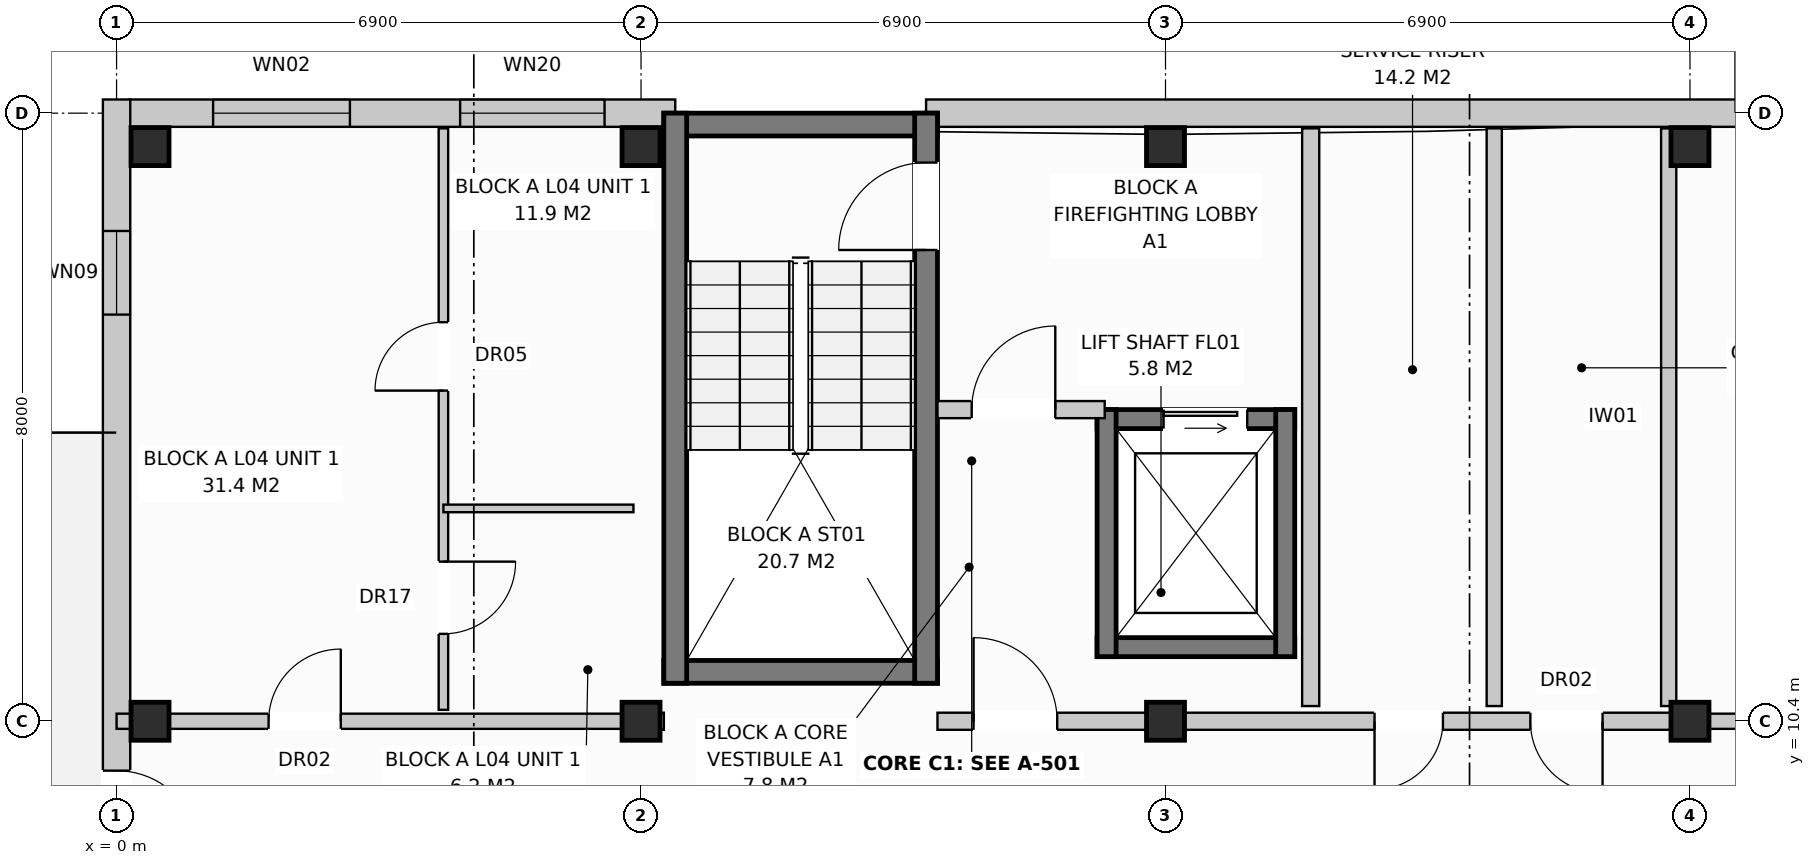
"""IFC4 building model, lengths in metres.
Left out: names, types, materials, properties, quantities, classifications, styles, units other than length and angle.
Written with IfcOpenShell. Run it as: python <this file> out.ifc"""

import sys

from ifc_helpers import new_model, si_unit, direction, frame, frame_2d, origin, origin_with_axes, origin_2d, place, context, subcontext, project, spatial, rectangle, extrude, element, fill, save


model = new_model("IFC4")
c1 = context("Model", 3, precision=1e-05, world=origin(), true_north=direction((0.0, 1.0)))
c2 = subcontext(c1, "Body", "Model", "MODEL_VIEW")
j1 = project(units=[si_unit("LENGTHUNIT", "METRE"), si_unit("PLANEANGLEUNIT", "RADIAN")], contexts=[c1])
p1 = place(None, origin())
s1 = spatial("IfcSite", under=j1, at=p1, CompositionType="ELEMENT")
p2 = place(p1, origin())
s2 = spatial("IfcBuilding", under=s1, at=p2, CompositionType="ELEMENT")
p3 = place(p2, frame((0.0, 0.0, 14.4)))
s3 = spatial("IfcBuildingStorey", under=s2, at=p3, CompositionType="ELEMENT", Elevation=14.4)
for number, where, z_axis, x_axis in (
    (1, (0.44, 10.4, 0.0), (0.0, 0.0, 1.0), (1.0, 0.0, 0.0)),
    (2, (0.44, 17.96, 0.0), (0.0, 0.0, 1.0), (1.0, 0.0, 0.0)),
    (3, (6.9, 10.4, 0.0), (0.0, 0.0, 1.0), (1.0, 0.0, 0.0)),
    (4, (6.9, 17.96, 0.0), (0.0, 0.0, 1.0), (1.0, 0.0, 0.0)),
    (5, (13.8, 10.4, 0.0), (0.0, 0.0, 1.0), (1.0, 0.0, 0.0)),
    (6, (13.8, 17.96, 0.0), (0.0, 0.0, 1.0), (1.0, 0.0, 0.0)),
    (7, (20.7, 10.4, 0.0), (0.0, 0.0, 1.0), (1.0, 0.0, 0.0)),
    (8, (20.7, 17.96, 0.0), (0.0, 0.0, 1.0), (1.0, 0.0, 0.0)),
):
    element("IfcColumn", number, at=place(p3, frame(where, z_axis=z_axis, x_axis=x_axis)), inside=s3, PredefinedType="COLUMN", context=c2, shape_type="SweptSolid", body=[
        extrude(rectangle(XDim=0.5, YDim=0.5, at=origin_2d()), origin(), (0.0, 0.0, 1.0), 3.2),
    ])
p4 = place(p3, frame((0.17, 18.4, 0.0), z_axis=(0.0, 0.0, 1.0), x_axis=(1.0, 0.0, 0.0)))
e9 = element("IfcWall", 9, at=p4, inside=s3, PredefinedType="STANDARD", context=c2, shape_type="SweptSolid", body=[
    extrude(rectangle(XDim=7.18, YDim=0.36, at=frame_2d((3.59, 0.0))), origin(), (0.0, 0.0, 1.0), 2.94),
])
p5 = place(p4, frame((1.1, 0.0, 0.8)))
e10 = element("IfcOpeningElement", 10, at=p5, cuts=e9, PredefinedType="OPENING", context=c2, shape_type="SweptSolid", body=[
    extrude(rectangle(XDim=1.8, YDim=1.7, at=frame_2d((0.9, 0.85))), frame((0.0, 0.192, 0.0), z_axis=(0.0, -1.0, 0.0), x_axis=(1.0, 0.0, 0.0)), (0.0, 0.0, 1.0), 0.384),
])
p6 = place(p4, frame((4.35, 0.0, 0.8)))
e11 = element("IfcOpeningElement", 11, at=p6, cuts=e9, PredefinedType="OPENING", context=c2, shape_type="SweptSolid", body=[
    extrude(rectangle(XDim=1.9, YDim=1.85, at=frame_2d((0.95, 0.925))), frame((0.0, 0.192, 0.0), z_axis=(0.0, -1.0, 0.0), x_axis=(1.0, 0.0, 0.0)), (0.0, 0.0, 1.0), 0.384),
])
p7 = place(p3, frame((10.65, 18.4, 0.0), z_axis=(0.0, 0.0, 1.0), x_axis=(1.0, 0.0, 0.0)))
e12 = element("IfcWall", 12, at=p7, inside=s3, PredefinedType="STANDARD", context=c2, shape_type="SweptSolid", body=[
    extrude(rectangle(XDim=17.4, YDim=0.36, at=frame_2d((8.7, 0.0))), origin(), (0.0, 0.0, 1.0), 2.94),
])
p8 = place(p7, frame((11.82, 0.0, 0.0)))
e13 = element("IfcOpeningElement", 13, at=p8, cuts=e12, PredefinedType="OPENING", context=c2, shape_type="SweptSolid", body=[
    extrude(rectangle(XDim=1.05, YDim=2.12, at=frame_2d((0.525, 1.06))), frame((0.0, 0.192, 0.0), z_axis=(0.0, -1.0, 0.0), x_axis=(1.0, 0.0, 0.0)), (0.0, 0.0, 1.0), 0.384),
])
p9 = place(p7, frame((14.87, 0.0, 0.72)))
e14 = element("IfcOpeningElement", 14, at=p9, cuts=e12, PredefinedType="OPENING", context=c2, shape_type="SweptSolid", body=[
    extrude(rectangle(XDim=1.1, YDim=1.5, at=frame_2d((0.55, 0.75))), frame((0.0, 0.192, 0.0), z_axis=(0.0, -1.0, 0.0), x_axis=(1.0, 0.0, 0.0)), (0.0, 0.0, 1.0), 0.384),
])
p10 = place(p3, frame((0.0, -0.18, 0.0), z_axis=(0.0, 0.0, 1.0), x_axis=(0.0, 1.0, 0.0)))
e15 = element("IfcWall", 15, at=p10, inside=s3, PredefinedType="STANDARD", context=c2, shape_type="SweptSolid", body=[
    extrude(rectangle(XDim=18.76, YDim=0.36, at=frame_2d((9.38, 0.0))), origin(), (0.0, 0.0, 1.0), 2.94),
])
p11 = place(p10, frame((8.83, 0.0, 0.0)))
e16 = element("IfcOpeningElement", 16, at=p11, cuts=e15, PredefinedType="OPENING", context=c2, shape_type="SweptSolid", body=[
    extrude(rectangle(XDim=1.1, YDim=2.1, at=frame_2d((0.55, 1.05))), frame((0.0, 0.192, 0.0), z_axis=(0.0, -1.0, 0.0), x_axis=(1.0, 0.0, 0.0)), (0.0, 0.0, 1.0), 0.384),
])
p12 = place(p10, frame((1.73, 0.0, 0.72)))
e17 = element("IfcOpeningElement", 17, at=p12, cuts=e15, PredefinedType="OPENING", context=c2, shape_type="SweptSolid", body=[
    extrude(rectangle(XDim=1.1, YDim=1.5, at=frame_2d((0.55, 0.75))), frame((0.0, 0.192, 0.0), z_axis=(0.0, -1.0, 0.0), x_axis=(1.0, 0.0, 0.0)), (0.0, 0.0, 1.0), 0.384),
])
p13 = place(p10, frame((15.93, 0.0, 0.72)))
e18 = element("IfcOpeningElement", 18, at=p13, cuts=e15, PredefinedType="OPENING", context=c2, shape_type="SweptSolid", body=[
    extrude(rectangle(XDim=1.1, YDim=1.5, at=frame_2d((0.55, 0.75))), frame((0.0, 0.192, 0.0), z_axis=(0.0, -1.0, 0.0), x_axis=(1.0, 0.0, 0.0)), (0.0, 0.0, 1.0), 0.384),
])
for number, where, z_axis, x_axis in (
    (19, (7.2, 18.25, 0.0), (0.0, 0.0, 1.0), (1.0, 0.0, 0.0)),
    (20, (7.2, 11.05, 0.0), (0.0, 0.0, 1.0), (1.0, 0.0, 0.0)),
):
    element("IfcWall", number, at=place(p3, frame(where, z_axis=z_axis, x_axis=x_axis)), inside=s3, PredefinedType="SHEAR", context=c2, shape_type="SweptSolid", body=[
        extrude(rectangle(XDim=3.6, YDim=0.3, at=frame_2d((1.8, 0.0))), origin(), (0.0, 0.0, 1.0), 2.94),
    ])
p14 = place(p3, frame((7.35, 10.9, 0.0), z_axis=(0.0, 0.0, 1.0), x_axis=(0.0, 1.0, 0.0)))
e21 = element("IfcWall", 21, at=p14, inside=s3, PredefinedType="SHEAR", context=c2, shape_type="SweptSolid", body=[
    extrude(rectangle(XDim=7.5, YDim=0.3, at=frame_2d((3.75, 0.0))), origin(), (0.0, 0.0, 1.0), 2.94),
])
p15 = place(p3, frame((10.65, 10.9, 0.0), z_axis=(0.0, 0.0, 1.0), x_axis=(0.0, 1.0, 0.0)))
e22 = element("IfcWall", 22, at=p15, inside=s3, PredefinedType="SHEAR", context=c2, shape_type="SweptSolid", body=[
    extrude(rectangle(XDim=7.5, YDim=0.3, at=frame_2d((3.75, 0.0))), origin(), (0.0, 0.0, 1.0), 2.94),
])
p16 = place(p15, frame((5.7, 0.0, 0.0)))
e23 = element("IfcOpeningElement", 23, at=p16, cuts=e22, PredefinedType="OPENING", context=c2, shape_type="SweptSolid", body=[
    extrude(rectangle(XDim=1.15, YDim=2.15, at=frame_2d((0.575, 1.075))), frame((0.0, 0.162, 0.0), z_axis=(0.0, -1.0, 0.0), x_axis=(1.0, 0.0, 0.0)), (0.0, 0.0, 1.0), 0.324),
])
p17 = place(p3, frame((12.9, 14.375, 0.0), z_axis=(0.0, 0.0, 1.0), x_axis=(1.0, 0.0, 0.0)))
e24 = element("IfcWall", 24, at=p17, inside=s3, PredefinedType="SHEAR", context=c2, shape_type="SweptSolid", body=[
    extrude(rectangle(XDim=2.6, YDim=0.25, at=frame_2d((1.3, 0.0))), origin(), (0.0, 0.0, 1.0), 2.94),
])
p18 = place(p17, frame((0.875, 0.0, 0.0)))
e25 = element("IfcOpeningElement", 25, at=p18, cuts=e24, PredefinedType="OPENING", context=c2, shape_type="SweptSolid", body=[
    extrude(rectangle(XDim=1.1, YDim=2.1, at=frame_2d((0.55, 1.05))), frame((0.0, 0.137, 0.0), z_axis=(0.0, -1.0, 0.0), x_axis=(1.0, 0.0, 0.0)), (0.0, 0.0, 1.0), 0.274),
])
p19 = place(p3, frame((12.9, 11.375, 0.0), z_axis=(0.0, 0.0, 1.0), x_axis=(1.0, 0.0, 0.0)))
e26 = element("IfcWall", 26, at=p19, inside=s3, PredefinedType="SHEAR", context=c2, shape_type="SweptSolid", body=[
    extrude(rectangle(XDim=2.6, YDim=0.25, at=frame_2d((1.3, 0.0))), origin(), (0.0, 0.0, 1.0), 2.94),
])
for number, where, z_axis, x_axis in (
    (27, (13.025, 11.25, 0.0), (0.0, 0.0, 1.0), (0.0, 1.0, 0.0)),
    (28, (15.375, 11.25, 0.0), (0.0, 0.0, 1.0), (0.0, 1.0, 0.0)),
):
    element("IfcWall", number, at=place(p3, frame(where, z_axis=z_axis, x_axis=x_axis)), inside=s3, PredefinedType="SHEAR", context=c2, shape_type="SweptSolid", body=[
        extrude(rectangle(XDim=3.25, YDim=0.25, at=frame_2d((1.625, 0.0))), origin(), (0.0, 0.0, 1.0), 2.94),
    ])
p20 = place(p3, frame((15.71, 10.6, 0.0), z_axis=(0.0, 0.0, 1.0), x_axis=(0.0, 1.0, 0.0)))
e29 = element("IfcWall", 29, at=p20, inside=s3, PredefinedType="PARTITIONING", context=c2, shape_type="SweptSolid", body=[
    extrude(rectangle(XDim=7.6, YDim=0.225, at=frame_2d((3.8, 0.0))), origin(), (0.0, 0.0, 1.0), 2.59),
])
p21 = place(p3, frame((10.8, 14.5, 0.0), z_axis=(0.0, 0.0, 1.0), x_axis=(1.0, 0.0, 0.0)))
e30 = element("IfcWall", 30, at=p21, inside=s3, PredefinedType="PARTITIONING", context=c2, shape_type="SweptSolid", body=[
    extrude(rectangle(XDim=2.2, YDim=0.225, at=frame_2d((1.1, 0.0))), origin(), (0.0, 0.0, 1.0), 2.94),
])
p22 = place(p21, frame((0.45, 0.0, 0.0)))
e31 = element("IfcOpeningElement", 31, at=p22, cuts=e30, PredefinedType="OPENING", context=c2, shape_type="SweptSolid", body=[
    extrude(rectangle(XDim=1.1, YDim=2.15, at=frame_2d((0.55, 1.075))), frame((0.0, 0.125, 0.0), z_axis=(0.0, -1.0, 0.0), x_axis=(1.0, 0.0, 0.0)), (0.0, 0.0, 1.0), 0.249),
])
p23 = place(p3, frame((6.9, 10.4, 0.0), z_axis=(0.0, 0.0, 1.0), x_axis=(1.0, 0.0, 0.0)))
e32 = element("IfcWall", 32, at=p23, inside=s3, PredefinedType="PARTITIONING", context=c2, shape_type="SweptSolid", body=[
    extrude(rectangle(XDim=0.3, YDim=0.225, at=frame_2d((0.15, 0.0))), origin(), (0.0, 0.0, 1.0), 2.94),
])
for number, where, z_axis, x_axis in (
    (33, (18.125, 10.6, 0.0), (0.0, 0.0, 1.0), (0.0, 1.0, 0.0)),
    (34, (20.42, 10.6, 0.0), (0.0, 0.0, 1.0), (0.0, 1.0, 0.0)),
):
    element("IfcWall", number, at=place(p3, frame(where, z_axis=z_axis, x_axis=x_axis)), inside=s3, PredefinedType="PARTITIONING", context=c2, shape_type="SweptSolid", body=[
        extrude(rectangle(XDim=7.6, YDim=0.2, at=frame_2d((3.8, 0.0))), origin(), (0.0, 0.0, 1.0), 2.94),
    ])
p24 = place(p3, frame((10.8, 10.4, 0.0), z_axis=(0.0, 0.0, 1.0), x_axis=(1.0, 0.0, 0.0)))
e35 = element("IfcWall", 35, at=p24, inside=s3, PredefinedType="PARTITIONING", context=c2, shape_type="SweptSolid", body=[
    extrude(rectangle(XDim=9.9, YDim=0.225, at=frame_2d((4.95, 0.0))), origin(), (0.0, 0.0, 1.0), 2.38),
])
p25 = place(p24, frame((0.475, 0.0, 0.0)))
e36 = element("IfcOpeningElement", 36, at=p25, cuts=e35, PredefinedType="OPENING", context=c2, shape_type="SweptSolid", body=[
    extrude(rectangle(XDim=1.1, YDim=2.15, at=frame_2d((0.55, 1.075))), frame((0.0, 0.125, 0.0), z_axis=(0.0, -1.0, 0.0), x_axis=(1.0, 0.0, 0.0)), (0.0, 0.0, 1.0), 0.249),
])
p26 = place(p24, frame((5.75, 0.0, 0.0)))
e37 = element("IfcOpeningElement", 37, at=p26, cuts=e35, PredefinedType="OPENING", context=c2, shape_type="SweptSolid", body=[
    extrude(rectangle(XDim=0.9, YDim=2.1, at=frame_2d((0.45, 1.05))), frame((0.0, 0.125, 0.0), z_axis=(0.0, -1.0, 0.0), x_axis=(1.0, 0.0, 0.0)), (0.0, 0.0, 1.0), 0.249),
])
p27 = place(p24, frame((7.8, 0.0, 0.0)))
e38 = element("IfcOpeningElement", 38, at=p27, cuts=e35, PredefinedType="OPENING", context=c2, shape_type="SweptSolid", body=[
    extrude(rectangle(XDim=0.95, YDim=2.15, at=frame_2d((0.475, 1.075))), frame((0.0, 0.125, 0.0), z_axis=(0.0, -1.0, 0.0), x_axis=(1.0, 0.0, 0.0)), (0.0, 0.0, 1.0), 0.249),
])
p28 = place(p3, frame((0.0, 10.4, 0.0), z_axis=(0.0, 0.0, 1.0), x_axis=(1.0, 0.0, 0.0)))
e39 = element("IfcWall", 39, at=p28, inside=s3, PredefinedType="PARTITIONING", context=c2, shape_type="SweptSolid", body=[
    extrude(rectangle(XDim=6.9, YDim=0.2, at=frame_2d((3.45, 0.0))), origin(), (0.0, 0.0, 1.0), 2.38),
])
p29 = place(p28, frame((2.0, 0.0, 0.0)))
e40 = element("IfcOpeningElement", 40, at=p29, cuts=e39, PredefinedType="OPENING", context=c2, shape_type="SweptSolid", body=[
    extrude(rectangle(XDim=0.95, YDim=2.15, at=frame_2d((0.475, 1.075))), frame((0.0, 0.112, 0.0), z_axis=(0.0, -1.0, 0.0), x_axis=(1.0, 0.0, 0.0)), (0.0, 0.0, 1.0), 0.224),
])
p30 = place(p3, frame((4.3, 10.55, 0.0), z_axis=(0.0, 0.0, 1.0), x_axis=(0.0, 1.0, 0.0)))
e41 = element("IfcWall", 41, at=p30, inside=s3, PredefinedType="PARTITIONING", context=c2, shape_type="SweptSolid", body=[
    extrude(rectangle(XDim=7.65, YDim=0.125, at=frame_2d((3.825, 0.0))), origin(), (0.0, 0.0, 1.0), 2.94),
])
p31 = place(p30, frame((1.0, 0.0, 0.0)))
e42 = element("IfcOpeningElement", 42, at=p31, cuts=e41, PredefinedType="OPENING", context=c2, shape_type="SweptSolid", body=[
    extrude(rectangle(XDim=0.95, YDim=2.1, at=frame_2d((0.475, 1.05))), frame((0.0, 0.074, 0.0), z_axis=(0.0, -1.0, 0.0), x_axis=(1.0, 0.0, 0.0)), (0.0, 0.0, 1.0), 0.149),
])
p32 = place(p30, frame((4.2, 0.0, 0.0)))
e43 = element("IfcOpeningElement", 43, at=p32, cuts=e41, PredefinedType="OPENING", context=c2, shape_type="SweptSolid", body=[
    extrude(rectangle(XDim=0.9, YDim=2.1, at=frame_2d((0.45, 1.05))), frame((0.0, 0.074, 0.0), z_axis=(0.0, -1.0, 0.0), x_axis=(1.0, 0.0, 0.0)), (0.0, 0.0, 1.0), 0.149),
])
p33 = place(p3, frame((4.3, 13.2, 0.0), z_axis=(0.0, 0.0, 1.0), x_axis=(1.0, 0.0, 0.0)))
e44 = element("IfcWall", 44, at=p33, inside=s3, PredefinedType="PARTITIONING", context=c2, shape_type="SweptSolid", body=[
    extrude(rectangle(XDim=2.5, YDim=0.1, at=frame_2d((1.25, 0.0))), origin(), (0.0, 0.0, 1.0), 2.94),
])
p34 = place(p3, frame((20.7, 10.4, 0.0), z_axis=(0.0, 0.0, 1.0), x_axis=(1.0, 0.0, 0.0)))
e45 = element("IfcWall", 45, at=p34, inside=s3, PredefinedType="PARTITIONING", context=c2, shape_type="SweptSolid", body=[
    extrude(rectangle(XDim=6.9, YDim=0.2, at=frame_2d((3.45, 0.0))), origin(), (0.0, 0.0, 1.0), 2.38),
])
p35 = place(p34, frame((2.0, 0.0, 0.0)))
e46 = element("IfcOpeningElement", 46, at=p35, cuts=e45, PredefinedType="OPENING", context=c2, shape_type="SweptSolid", body=[
    extrude(rectangle(XDim=0.95, YDim=2.15, at=frame_2d((0.475, 1.075))), frame((0.0, 0.112, 0.0), z_axis=(0.0, -1.0, 0.0), x_axis=(1.0, 0.0, 0.0)), (0.0, 0.0, 1.0), 0.224),
])
p36 = place(p5, origin_with_axes())
e47 = element("IfcWindow", 47, at=p36, inside=s3, PartitioningType="SINGLE_PANEL", PredefinedType="WINDOW", context=c2, shape_type="SweptSolid", body=[
    extrude(rectangle(XDim=1.8, YDim=1.7, at=frame_2d((0.9, 0.85))), frame((0.0, 0.03, 0.0), z_axis=(0.0, -1.0, 0.0), x_axis=(1.0, 0.0, 0.0)), (0.0, 0.0, 1.0), 0.06),
])
fill(e10, e47)
p37 = place(p6, origin_with_axes())
e48 = element("IfcWindow", 48, at=p37, inside=s3, PartitioningType="SINGLE_PANEL", PredefinedType="WINDOW", context=c2, shape_type="SweptSolid", body=[
    extrude(rectangle(XDim=1.9, YDim=1.85, at=frame_2d((0.95, 0.925))), frame((0.0, 0.03, 0.0), z_axis=(0.0, -1.0, 0.0), x_axis=(1.0, 0.0, 0.0)), (0.0, 0.0, 1.0), 0.06),
])
fill(e11, e48)
p38 = place(p11, frame((1.1, 0.0, 0.0), z_axis=(0.0, 0.0, 1.0), x_axis=(-1.0, 0.0, 0.0)))
e49 = element("IfcDoor", 49, at=p38, inside=s3, OperationType="SINGLE_SWING_LEFT", PredefinedType="DOOR", context=c2, shape_type="SweptSolid", body=[
    extrude(rectangle(XDim=1.1, YDim=2.1, at=frame_2d((0.55, 1.05))), frame((0.0, 0.025, 0.0), z_axis=(0.0, -1.0, 0.0), x_axis=(1.0, 0.0, 0.0)), (0.0, 0.0, 1.0), 0.05),
])
fill(e16, e49)
p39 = place(p13, origin_with_axes())
e50 = element("IfcWindow", 50, at=p39, inside=s3, PartitioningType="SINGLE_PANEL", PredefinedType="WINDOW", context=c2, shape_type="SweptSolid", body=[
    extrude(rectangle(XDim=1.1, YDim=1.5, at=frame_2d((0.55, 0.75))), frame((0.0, 0.03, 0.0), z_axis=(0.0, -1.0, 0.0), x_axis=(1.0, 0.0, 0.0)), (0.0, 0.0, 1.0), 0.06),
])
fill(e18, e50)
p40 = place(p16, origin_with_axes())
e51 = element("IfcDoor", 51, at=p40, inside=s3, OperationType="SINGLE_SWING_LEFT", PredefinedType="DOOR", context=c2, shape_type="SweptSolid", body=[
    extrude(rectangle(XDim=1.15, YDim=2.15, at=frame_2d((0.575, 1.075))), frame((0.0, 0.025, 0.0), z_axis=(0.0, -1.0, 0.0), x_axis=(1.0, 0.0, 0.0)), (0.0, 0.0, 1.0), 0.05),
])
fill(e23, e51)
p41 = place(p18, origin_with_axes())
e52 = element("IfcDoor", 52, at=p41, inside=s3, OperationType="SLIDING_TO_LEFT", PredefinedType="DOOR", context=c2, shape_type="SweptSolid", body=[
    extrude(rectangle(XDim=1.1, YDim=2.1, at=frame_2d((0.55, 1.05))), frame((0.0, 0.025, 0.0), z_axis=(0.0, -1.0, 0.0), x_axis=(1.0, 0.0, 0.0)), (0.0, 0.0, 1.0), 0.05),
])
fill(e25, e52)
p42 = place(p22, origin_with_axes())
e53 = element("IfcDoor", 53, at=p42, inside=s3, OperationType="SINGLE_SWING_RIGHT", PredefinedType="DOOR", context=c2, shape_type="SweptSolid", body=[
    extrude(rectangle(XDim=1.1, YDim=2.15, at=frame_2d((0.55, 1.075))), frame((0.0, 0.025, 0.0), z_axis=(0.0, -1.0, 0.0), x_axis=(1.0, 0.0, 0.0)), (0.0, 0.0, 1.0), 0.05),
])
fill(e31, e53)
p43 = place(p25, origin_with_axes())
e54 = element("IfcDoor", 54, at=p43, inside=s3, OperationType="SINGLE_SWING_LEFT", PredefinedType="DOOR", context=c2, shape_type="SweptSolid", body=[
    extrude(rectangle(XDim=1.1, YDim=2.15, at=frame_2d((0.55, 1.075))), frame((0.0, 0.025, 0.0), z_axis=(0.0, -1.0, 0.0), x_axis=(1.0, 0.0, 0.0)), (0.0, 0.0, 1.0), 0.05),
])
fill(e36, e54)
p44 = place(p26, frame((0.9, 0.0, 0.0), z_axis=(0.0, 0.0, 1.0), x_axis=(-1.0, 0.0, 0.0)))
e55 = element("IfcDoor", 55, at=p44, inside=s3, OperationType="SINGLE_SWING_LEFT", PredefinedType="DOOR", context=c2, shape_type="SweptSolid", body=[
    extrude(rectangle(XDim=0.9, YDim=2.1, at=frame_2d((0.45, 1.05))), frame((0.0, 0.025, 0.0), z_axis=(0.0, -1.0, 0.0), x_axis=(1.0, 0.0, 0.0)), (0.0, 0.0, 1.0), 0.05),
])
fill(e37, e55)
p45 = place(p27, frame((0.95, 0.0, 0.0), z_axis=(0.0, 0.0, 1.0), x_axis=(-1.0, 0.0, 0.0)))
e56 = element("IfcDoor", 56, at=p45, inside=s3, OperationType="SINGLE_SWING_RIGHT", PredefinedType="DOOR", context=c2, shape_type="SweptSolid", body=[
    extrude(rectangle(XDim=0.95, YDim=2.15, at=frame_2d((0.475, 1.075))), frame((0.0, 0.025, 0.0), z_axis=(0.0, -1.0, 0.0), x_axis=(1.0, 0.0, 0.0)), (0.0, 0.0, 1.0), 0.05),
])
fill(e38, e56)
p46 = place(p29, origin_with_axes())
e57 = element("IfcDoor", 57, at=p46, inside=s3, OperationType="SINGLE_SWING_RIGHT", PredefinedType="DOOR", context=c2, shape_type="SweptSolid", body=[
    extrude(rectangle(XDim=0.95, YDim=2.15, at=frame_2d((0.475, 1.075))), frame((0.0, 0.025, 0.0), z_axis=(0.0, -1.0, 0.0), x_axis=(1.0, 0.0, 0.0)), (0.0, 0.0, 1.0), 0.05),
])
fill(e40, e57)
p47 = place(p31, frame((0.95, 0.0, 0.0), z_axis=(0.0, 0.0, 1.0), x_axis=(-1.0, 0.0, 0.0)))
e58 = element("IfcDoor", 58, at=p47, inside=s3, OperationType="SINGLE_SWING_RIGHT", PredefinedType="DOOR", context=c2, shape_type="SweptSolid", body=[
    extrude(rectangle(XDim=0.95, YDim=2.1, at=frame_2d((0.475, 1.05))), frame((0.0, 0.025, 0.0), z_axis=(0.0, -1.0, 0.0), x_axis=(1.0, 0.0, 0.0)), (0.0, 0.0, 1.0), 0.05),
])
fill(e42, e58)
p48 = place(p32, origin_with_axes())
e59 = element("IfcDoor", 59, at=p48, inside=s3, OperationType="SINGLE_SWING_LEFT", PredefinedType="DOOR", context=c2, shape_type="SweptSolid", body=[
    extrude(rectangle(XDim=0.9, YDim=2.1, at=frame_2d((0.45, 1.05))), frame((0.0, 0.025, 0.0), z_axis=(0.0, -1.0, 0.0), x_axis=(1.0, 0.0, 0.0)), (0.0, 0.0, 1.0), 0.05),
])
fill(e43, e59)
save(model, sys.argv[1])
